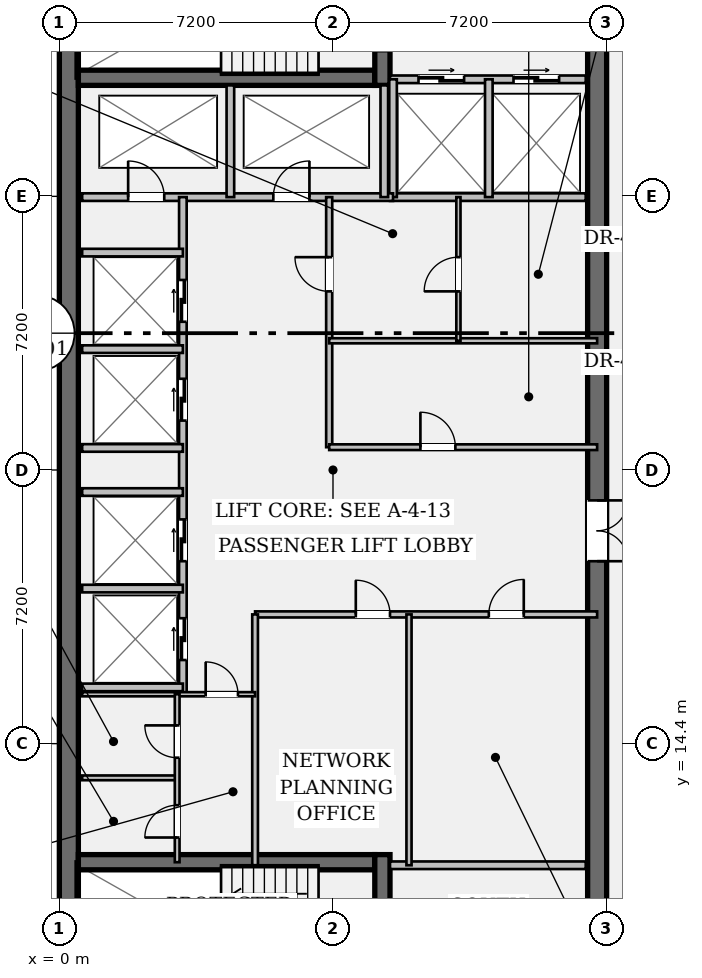
"""IFC4 building model, lengths in metres.
Left out: names, types, materials, properties, quantities, classifications, styles, units other than length and angle.
Written with IfcOpenShell. Run it as: python <this file> out.ifc"""

import sys

from ifc_helpers import new_model, si_unit, direction, frame, frame_2d, origin, place, context, subcontext, project, spatial, rectangle, extrude, element, fill, save


model = new_model("IFC4")
c1 = context("Model", 3, precision=1e-05, world=origin(), true_north=direction((0.0, 1.0)))
c2 = subcontext(c1, "Body", "Model", "MODEL_VIEW")
j1 = project(units=[si_unit("LENGTHUNIT", "METRE"), si_unit("PLANEANGLEUNIT", "RADIAN")], contexts=[c1])
p1 = place(None, origin())
s1 = spatial("IfcSite", under=j1, at=p1, CompositionType="ELEMENT")
p2 = place(p1, origin())
s2 = spatial("IfcBuilding", under=s1, at=p2, CompositionType="ELEMENT")
p3 = place(p2, frame((0.0, 0.0, 286.65)))
s3 = spatial("IfcBuildingStorey", under=s2, at=p3, CompositionType="ELEMENT", Elevation=286.65)
p4 = place(p3, frame((0.25, 7.2, 0.0), z_axis=(0.0, 0.0, 1.0), x_axis=(0.0, 1.0, 0.0)))
e1 = element("IfcWall", 1, at=p4, inside=s3, PredefinedType="SHEAR", context=c2, shape_type="SweptSolid", body=[
    extrude(rectangle(XDim=28.8, YDim=0.5, at=frame_2d((14.4, 0.0))), origin(), (0.0, 0.0, 1.0), 3.24),
])
p5 = place(p3, frame((14.15, 35.5, 0.0), z_axis=(0.0, 0.0, 1.0), x_axis=(0.0, -1.0, 0.0)))
e2 = element("IfcWall", 2, at=p5, inside=s3, PredefinedType="SHEAR", context=c2, shape_type="SweptSolid", body=[
    extrude(rectangle(XDim=27.8, YDim=0.5, at=frame_2d((13.9, 0.0))), origin(), (0.0, 0.0, 1.0), 3.24),
])
p6 = place(p5, frame((1.4, 0.0, 0.0)))
e3 = element("IfcOpeningElement", 3, at=p6, cuts=e2, PredefinedType="OPENING", context=c2, shape_type="SweptSolid", body=[
    extrude(rectangle(XDim=1.2, YDim=2.15, at=frame_2d((0.6, 1.075))), frame((0.0, 0.262, 0.0), z_axis=(0.0, -1.0, 0.0), x_axis=(1.0, 0.0, 0.0)), (0.0, 0.0, 1.0), 0.524),
])
p7 = place(p5, frame((25.35, 0.0, 0.0)))
e4 = element("IfcOpeningElement", 4, at=p7, cuts=e2, PredefinedType="OPENING", context=c2, shape_type="SweptSolid", body=[
    extrude(rectangle(XDim=1.2, YDim=2.15, at=frame_2d((0.6, 1.075))), frame((0.0, 0.262, 0.0), z_axis=(0.0, -1.0, 0.0), x_axis=(1.0, 0.0, 0.0)), (0.0, 0.0, 1.0), 0.524),
])
p8 = place(p5, frame((14.7, 0.0, 0.0)))
e5 = element("IfcOpeningElement", 5, at=p8, cuts=e2, PredefinedType="OPENING", context=c2, shape_type="SweptSolid", body=[
    extrude(rectangle(XDim=1.6, YDim=2.2, at=frame_2d((0.8, 1.1))), frame((0.0, 0.262, 0.0), z_axis=(0.0, -1.0, 0.0), x_axis=(1.0, 0.0, 0.0)), (0.0, 0.0, 1.0), 0.524),
])
for number, where, z_axis, x_axis in (
    (6, (0.5, 31.92, 0.0), (0.0, 0.0, 1.0), (1.0, 0.0, 0.0)),
    (7, (0.5, 11.28, 0.0), (0.0, 0.0, 1.0), (1.0, 0.0, 0.0)),
):
    element("IfcWall", number, at=place(p3, frame(where, z_axis=z_axis, x_axis=x_axis)), inside=s3, PredefinedType="SHEAR", context=c2, shape_type="SweptSolid", body=[
        extrude(rectangle(XDim=7.8, YDim=0.4, at=frame_2d((3.9, 0.0))), origin(), (0.0, 0.0, 1.0), 3.24),
    ])
p9 = place(p3, frame((8.5, 31.72, 0.0), z_axis=(0.0, 0.0, 1.0), x_axis=(0.0, 1.0, 0.0)))
e8 = element("IfcWall", 8, at=p9, inside=s3, PredefinedType="SHEAR", context=c2, shape_type="SweptSolid", body=[
    extrude(rectangle(XDim=3.78, YDim=0.4, at=frame_2d((1.89, 0.0))), origin(), (0.0, 0.0, 1.0), 3.24),
])
p10 = place(p9, frame((0.9, 0.0, 0.0)))
e9 = element("IfcOpeningElement", 9, at=p10, cuts=e8, PredefinedType="OPENING", context=c2, shape_type="SweptSolid", body=[
    extrude(rectangle(XDim=1.1, YDim=2.15, at=frame_2d((0.55, 1.075))), frame((0.0, 0.212, 0.0), z_axis=(0.0, -1.0, 0.0), x_axis=(1.0, 0.0, 0.0)), (0.0, 0.0, 1.0), 0.424),
])
p11 = place(p3, frame((8.5, 7.7, 0.0), z_axis=(0.0, 0.0, 1.0), x_axis=(0.0, 1.0, 0.0)))
e10 = element("IfcWall", 10, at=p11, inside=s3, PredefinedType="SHEAR", context=c2, shape_type="SweptSolid", body=[
    extrude(rectangle(XDim=3.78, YDim=0.4, at=frame_2d((1.89, 0.0))), origin(), (0.0, 0.0, 1.0), 3.24),
])
p12 = place(p11, frame((0.85, 0.0, 0.0)))
e11 = element("IfcOpeningElement", 11, at=p12, cuts=e10, PredefinedType="OPENING", context=c2, shape_type="SweptSolid", body=[
    extrude(rectangle(XDim=1.1, YDim=2.15, at=frame_2d((0.55, 1.075))), frame((0.0, 0.212, 0.0), z_axis=(0.0, -1.0, 0.0), x_axis=(1.0, 0.0, 0.0)), (0.0, 0.0, 1.0), 0.424),
])
p13 = place(p3, frame((8.7, 31.88, 0.0), z_axis=(0.0, 0.0, 1.0), x_axis=(1.0, 0.0, 0.0)))
e12 = element("IfcWall", 12, at=p13, inside=s3, PredefinedType="PARTITIONING", context=c2, shape_type="SweptSolid", body=[
    extrude(rectangle(XDim=5.15, YDim=0.2, at=frame_2d((2.575, 0.0))), origin(), (0.0, 0.0, 1.0), 3.24),
])
p14 = place(p13, frame((0.75, 0.0, 0.0)))
e13 = element("IfcOpeningElement", 13, at=p14, cuts=e12, PredefinedType="OPENING", context=c2, shape_type="SweptSolid", body=[
    extrude(rectangle(XDim=1.2, YDim=2.2, at=frame_2d((0.6, 1.1))), frame((0.0, 0.112, 0.0), z_axis=(0.0, -1.0, 0.0), x_axis=(1.0, 0.0, 0.0)), (0.0, 0.0, 1.0), 0.224),
])
p15 = place(p13, frame((3.25, 0.0, 0.0)))
e14 = element("IfcOpeningElement", 14, at=p15, cuts=e12, PredefinedType="OPENING", context=c2, shape_type="SweptSolid", body=[
    extrude(rectangle(XDim=1.2, YDim=2.2, at=frame_2d((0.6, 1.1))), frame((0.0, 0.112, 0.0), z_axis=(0.0, -1.0, 0.0), x_axis=(1.0, 0.0, 0.0)), (0.0, 0.0, 1.0), 0.224),
])
for number, where, z_axis, x_axis in (
    (15, (8.7, 11.2, 0.0), (0.0, 0.0, 1.0), (1.0, 0.0, 0.0)),
    (16, (8.7, 28.78, 0.0), (0.0, 0.0, 1.0), (1.0, 0.0, 0.0)),
):
    element("IfcWall", number, at=place(p3, frame(where, z_axis=z_axis, x_axis=x_axis)), inside=s3, PredefinedType="PARTITIONING", context=c2, shape_type="SweptSolid", body=[
        extrude(rectangle(XDim=5.15, YDim=0.2, at=frame_2d((2.575, 0.0))), origin(), (0.0, 0.0, 1.0), 3.24),
    ])
for number, where, z_axis, x_axis in (
    (17, (8.78, 28.78, 0.0), (0.0, 0.0, 1.0), (0.0, 1.0, 0.0)),
    (18, (11.3, 28.78, 0.0), (0.0, 0.0, 1.0), (0.0, 1.0, 0.0)),
):
    element("IfcWall", number, at=place(p3, frame(where, z_axis=z_axis, x_axis=x_axis)), inside=s3, PredefinedType="PARTITIONING", context=c2, shape_type="SweptSolid", body=[
        extrude(rectangle(XDim=3.1, YDim=0.2, at=frame_2d((1.55, 0.0))), origin(), (0.0, 0.0, 1.0), 3.24),
    ])
p16 = place(p3, frame((0.6, 28.78, 0.0), z_axis=(0.0, 0.0, 1.0), x_axis=(1.0, 0.0, 0.0)))
e19 = element("IfcWall", 19, at=p16, inside=s3, PredefinedType="PARTITIONING", context=c2, shape_type="SweptSolid", body=[
    extrude(rectangle(XDim=8.18, YDim=0.2, at=frame_2d((4.09, 0.0))), origin(), (0.0, 0.0, 1.0), 3.24),
])
p17 = place(p16, frame((1.21, 0.0, 0.0)))
e20 = element("IfcOpeningElement", 20, at=p17, cuts=e19, PredefinedType="OPENING", context=c2, shape_type="SweptSolid", body=[
    extrude(rectangle(XDim=0.95, YDim=2.15, at=frame_2d((0.475, 1.075))), frame((0.0, 0.112, 0.0), z_axis=(0.0, -1.0, 0.0), x_axis=(1.0, 0.0, 0.0)), (0.0, 0.0, 1.0), 0.224),
])
p18 = place(p16, frame((5.03, 0.0, 0.0)))
e21 = element("IfcOpeningElement", 21, at=p18, cuts=e19, PredefinedType="OPENING", context=c2, shape_type="SweptSolid", body=[
    extrude(rectangle(XDim=0.95, YDim=2.15, at=frame_2d((0.475, 1.075))), frame((0.0, 0.112, 0.0), z_axis=(0.0, -1.0, 0.0), x_axis=(1.0, 0.0, 0.0)), (0.0, 0.0, 1.0), 0.224),
])
for number, where, z_axis, x_axis in (
    (22, (4.5, 28.78, 0.0), (0.0, 0.0, 1.0), (0.0, 1.0, 0.0)),
    (23, (8.55, 28.78, 0.0), (0.0, 0.0, 1.0), (0.0, 1.0, 0.0)),
):
    element("IfcWall", number, at=place(p3, frame(where, z_axis=z_axis, x_axis=x_axis)), inside=s3, PredefinedType="PARTITIONING", context=c2, shape_type="SweptSolid", body=[
        extrude(rectangle(XDim=2.94, YDim=0.2, at=frame_2d((1.47, 0.0))), origin(), (0.0, 0.0, 1.0), 3.24),
    ])
p19 = place(p3, frame((3.25, 15.7, 0.0), z_axis=(0.0, 0.0, 1.0), x_axis=(0.0, 1.0, 0.0)))
e24 = element("IfcWall", 24, at=p19, inside=s3, PredefinedType="PARTITIONING", context=c2, shape_type="SweptSolid", body=[
    extrude(rectangle(XDim=13.08, YDim=0.2, at=frame_2d((6.54, 0.0))), origin(), (0.0, 0.0, 1.0), 3.24),
])
p20 = place(p19, frame((0.9, 0.0, 0.0)))
e25 = element("IfcOpeningElement", 25, at=p20, cuts=e24, PredefinedType="OPENING", context=c2, shape_type="SweptSolid", body=[
    extrude(rectangle(XDim=1.1, YDim=2.2, at=frame_2d((0.55, 1.1))), frame((0.0, 0.112, 0.0), z_axis=(0.0, -1.0, 0.0), x_axis=(1.0, 0.0, 0.0)), (0.0, 0.0, 1.0), 0.224),
])
p21 = place(p19, frame((3.5, 0.0, 0.0)))
e26 = element("IfcOpeningElement", 26, at=p21, cuts=e24, PredefinedType="OPENING", context=c2, shape_type="SweptSolid", body=[
    extrude(rectangle(XDim=1.1, YDim=2.2, at=frame_2d((0.55, 1.1))), frame((0.0, 0.112, 0.0), z_axis=(0.0, -1.0, 0.0), x_axis=(1.0, 0.0, 0.0)), (0.0, 0.0, 1.0), 0.224),
])
p22 = place(p19, frame((7.2, 0.0, 0.0)))
e27 = element("IfcOpeningElement", 27, at=p22, cuts=e24, PredefinedType="OPENING", context=c2, shape_type="SweptSolid", body=[
    extrude(rectangle(XDim=1.1, YDim=2.2, at=frame_2d((0.55, 1.1))), frame((0.0, 0.112, 0.0), z_axis=(0.0, -1.0, 0.0), x_axis=(1.0, 0.0, 0.0)), (0.0, 0.0, 1.0), 0.224),
])
p23 = place(p19, frame((9.8, 0.0, 0.0)))
e28 = element("IfcOpeningElement", 28, at=p23, cuts=e24, PredefinedType="OPENING", context=c2, shape_type="SweptSolid", body=[
    extrude(rectangle(XDim=1.1, YDim=2.2, at=frame_2d((0.55, 1.1))), frame((0.0, 0.112, 0.0), z_axis=(0.0, -1.0, 0.0), x_axis=(1.0, 0.0, 0.0)), (0.0, 0.0, 1.0), 0.224),
])
for number, where, z_axis, x_axis in (
    (29, (0.6, 15.88, 0.0), (0.0, 0.0, 1.0), (1.0, 0.0, 0.0)),
    (30, (0.6, 18.48, 0.0), (0.0, 0.0, 1.0), (1.0, 0.0, 0.0)),
    (31, (0.6, 22.18, 0.0), (0.0, 0.0, 1.0), (1.0, 0.0, 0.0)),
    (32, (0.6, 24.78, 0.0), (0.0, 0.0, 1.0), (1.0, 0.0, 0.0)),
    (33, (0.6, 21.02, 0.0), (0.0, 0.0, 1.0), (1.0, 0.0, 0.0)),
    (34, (0.6, 27.32, 0.0), (0.0, 0.0, 1.0), (1.0, 0.0, 0.0)),
):
    element("IfcWall", number, at=place(p3, frame(where, z_axis=z_axis, x_axis=x_axis)), inside=s3, PredefinedType="PARTITIONING", context=c2, shape_type="SweptSolid", body=[
        extrude(rectangle(XDim=2.65, YDim=0.2, at=frame_2d((1.325, 0.0))), origin(), (0.0, 0.0, 1.0), 3.24),
    ])
p24 = place(p3, frame((7.1, 22.2, 0.0), z_axis=(0.0, 0.0, 1.0), x_axis=(0.0, 1.0, 0.0)))
e35 = element("IfcWall", 35, at=p24, inside=s3, PredefinedType="PARTITIONING", context=c2, shape_type="SweptSolid", body=[
    extrude(rectangle(XDim=6.58, YDim=0.16, at=frame_2d((3.29, 0.0))), origin(), (0.0, 0.0, 1.0), 3.24),
])
p25 = place(p24, frame((4.1, 0.0, 0.0)))
e36 = element("IfcOpeningElement", 36, at=p25, cuts=e35, PredefinedType="OPENING", context=c2, shape_type="SweptSolid", body=[
    extrude(rectangle(XDim=0.9, YDim=2.15, at=frame_2d((0.45, 1.075))), frame((0.0, 0.092, 0.0), z_axis=(0.0, -1.0, 0.0), x_axis=(1.0, 0.0, 0.0)), (0.0, 0.0, 1.0), 0.184),
])
p26 = place(p3, frame((7.1, 22.2, 0.0), z_axis=(0.0, 0.0, 1.0), x_axis=(1.0, 0.0, 0.0)))
e37 = element("IfcWall", 37, at=p26, inside=s3, PredefinedType="PARTITIONING", context=c2, shape_type="SweptSolid", body=[
    extrude(rectangle(XDim=7.05, YDim=0.15, at=frame_2d((3.525, 0.0))), origin(), (0.0, 0.0, 1.0), 3.24),
])
p27 = place(p26, frame((2.4, 0.0, 0.0)))
e38 = element("IfcOpeningElement", 38, at=p27, cuts=e37, PredefinedType="OPENING", context=c2, shape_type="SweptSolid", body=[
    extrude(rectangle(XDim=0.92, YDim=2.15, at=frame_2d((0.46, 1.075))), frame((0.0, 0.087, 0.0), z_axis=(0.0, -1.0, 0.0), x_axis=(1.0, 0.0, 0.0)), (0.0, 0.0, 1.0), 0.174),
])
p28 = place(p3, frame((7.1, 25.0, 0.0), z_axis=(0.0, 0.0, 1.0), x_axis=(1.0, 0.0, 0.0)))
e39 = element("IfcWall", 39, at=p28, inside=s3, PredefinedType="PARTITIONING", context=c2, shape_type="SweptSolid", body=[
    extrude(rectangle(XDim=7.05, YDim=0.135, at=frame_2d((3.525, 0.0))), origin(), (0.0, 0.0, 1.0), 3.24),
])
p29 = place(p3, frame((10.5, 25.0, 0.0), z_axis=(0.0, 0.0, 1.0), x_axis=(0.0, 1.0, 0.0)))
e40 = element("IfcWall", 40, at=p29, inside=s3, PredefinedType="PARTITIONING", context=c2, shape_type="SweptSolid", body=[
    extrude(rectangle(XDim=3.78, YDim=0.11, at=frame_2d((1.89, 0.0))), origin(), (0.0, 0.0, 1.0), 3.24),
])
p30 = place(p29, frame((1.3, 0.0, 0.0)))
e41 = element("IfcOpeningElement", 41, at=p30, cuts=e40, PredefinedType="OPENING", context=c2, shape_type="SweptSolid", body=[
    extrude(rectangle(XDim=0.9, YDim=2.15, at=frame_2d((0.45, 1.075))), frame((0.0, 0.067, 0.0), z_axis=(0.0, -1.0, 0.0), x_axis=(1.0, 0.0, 0.0)), (0.0, 0.0, 1.0), 0.134),
])
p31 = place(p3, frame((5.15, 17.8, 0.0), z_axis=(0.0, 0.0, 1.0), x_axis=(1.0, 0.0, 0.0)))
e42 = element("IfcWall", 42, at=p31, inside=s3, PredefinedType="PARTITIONING", context=c2, shape_type="SweptSolid", body=[
    extrude(rectangle(XDim=9.0, YDim=0.16, at=frame_2d((4.5, 0.0))), origin(), (0.0, 0.0, 1.0), 3.24),
])
p32 = place(p31, frame((2.65, 0.0, 0.0)))
e43 = element("IfcOpeningElement", 43, at=p32, cuts=e42, PredefinedType="OPENING", context=c2, shape_type="SweptSolid", body=[
    extrude(rectangle(XDim=0.9, YDim=2.15, at=frame_2d((0.45, 1.075))), frame((0.0, 0.092, 0.0), z_axis=(0.0, -1.0, 0.0), x_axis=(1.0, 0.0, 0.0)), (0.0, 0.0, 1.0), 0.184),
])
p33 = place(p31, frame((6.15, 0.0, 0.0)))
e44 = element("IfcOpeningElement", 44, at=p33, cuts=e42, PredefinedType="OPENING", context=c2, shape_type="SweptSolid", body=[
    extrude(rectangle(XDim=0.92, YDim=2.15, at=frame_2d((0.46, 1.075))), frame((0.0, 0.092, 0.0), z_axis=(0.0, -1.0, 0.0), x_axis=(1.0, 0.0, 0.0)), (0.0, 0.0, 1.0), 0.184),
])
p34 = place(p3, frame((5.15, 11.2, 0.0), z_axis=(0.0, 0.0, 1.0), x_axis=(0.0, 1.0, 0.0)))
e45 = element("IfcWall", 45, at=p34, inside=s3, PredefinedType="PARTITIONING", context=c2, shape_type="SweptSolid", body=[
    extrude(rectangle(XDim=6.6, YDim=0.15, at=frame_2d((3.3, 0.0))), origin(), (0.0, 0.0, 1.0), 3.24),
])
p35 = place(p3, frame((9.2, 11.2, 0.0), z_axis=(0.0, 0.0, 1.0), x_axis=(0.0, 1.0, 0.0)))
e46 = element("IfcWall", 46, at=p35, inside=s3, PredefinedType="PARTITIONING", context=c2, shape_type="SweptSolid", body=[
    extrude(rectangle(XDim=6.6, YDim=0.135, at=frame_2d((3.3, 0.0))), origin(), (0.0, 0.0, 1.0), 3.24),
])
p36 = place(p3, frame((0.6, 15.7, 0.0), z_axis=(0.0, 0.0, 1.0), x_axis=(1.0, 0.0, 0.0)))
e47 = element("IfcWall", 47, at=p36, inside=s3, PredefinedType="PARTITIONING", context=c2, shape_type="SweptSolid", body=[
    extrude(rectangle(XDim=4.55, YDim=0.11, at=frame_2d((2.275, 0.0))), origin(), (0.0, 0.0, 1.0), 3.24),
])
p37 = place(p36, frame((3.25, 0.0, 0.0)))
e48 = element("IfcOpeningElement", 48, at=p37, cuts=e47, PredefinedType="OPENING", context=c2, shape_type="SweptSolid", body=[
    extrude(rectangle(XDim=0.85, YDim=2.15, at=frame_2d((0.425, 1.075))), frame((0.0, 0.067, 0.0), z_axis=(0.0, -1.0, 0.0), x_axis=(1.0, 0.0, 0.0)), (0.0, 0.0, 1.0), 0.134),
])
p38 = place(p3, frame((0.6, 13.5, 0.0), z_axis=(0.0, 0.0, 1.0), x_axis=(1.0, 0.0, 0.0)))
e49 = element("IfcWall", 49, at=p38, inside=s3, PredefinedType="PARTITIONING", context=c2, shape_type="SweptSolid", body=[
    extrude(rectangle(XDim=2.5, YDim=0.125, at=frame_2d((1.25, 0.0))), origin(), (0.0, 0.0, 1.0), 3.24),
])
p39 = place(p3, frame((3.1, 11.28, 0.0), z_axis=(0.0, 0.0, 1.0), x_axis=(0.0, 1.0, 0.0)))
e50 = element("IfcWall", 50, at=p39, inside=s3, PredefinedType="PARTITIONING", context=c2, shape_type="SweptSolid", body=[
    extrude(rectangle(XDim=4.42, YDim=0.125, at=frame_2d((2.21, 0.0))), origin(), (0.0, 0.0, 1.0), 3.24),
])
p40 = place(p39, frame((0.65, 0.0, 0.0)))
e51 = element("IfcOpeningElement", 51, at=p40, cuts=e50, PredefinedType="OPENING", context=c2, shape_type="SweptSolid", body=[
    extrude(rectangle(XDim=0.85, YDim=2.15, at=frame_2d((0.425, 1.075))), frame((0.0, 0.074, 0.0), z_axis=(0.0, -1.0, 0.0), x_axis=(1.0, 0.0, 0.0)), (0.0, 0.0, 1.0), 0.149),
])
p41 = place(p39, frame((2.75, 0.0, 0.0)))
e52 = element("IfcOpeningElement", 52, at=p41, cuts=e50, PredefinedType="OPENING", context=c2, shape_type="SweptSolid", body=[
    extrude(rectangle(XDim=0.85, YDim=2.15, at=frame_2d((0.425, 1.075))), frame((0.0, 0.074, 0.0), z_axis=(0.0, -1.0, 0.0), x_axis=(1.0, 0.0, 0.0)), (0.0, 0.0, 1.0), 0.149),
])
p42 = place(p14, origin())
e53 = element("IfcDoor", 53, at=p42, inside=s3, OperationType="DOUBLE_DOOR_SLIDING", PredefinedType="DOOR", context=c2, shape_type="SweptSolid", body=[
    extrude(rectangle(XDim=1.2, YDim=2.2, at=frame_2d((0.6, 1.1))), frame((0.0, 0.025, 0.0), z_axis=(0.0, -1.0, 0.0), x_axis=(1.0, 0.0, 0.0)), (0.0, 0.0, 1.0), 0.05),
])
fill(e13, e53)
p43 = place(p15, origin())
e54 = element("IfcDoor", 54, at=p43, inside=s3, OperationType="DOUBLE_DOOR_SLIDING", PredefinedType="DOOR", context=c2, shape_type="SweptSolid", body=[
    extrude(rectangle(XDim=1.2, YDim=2.2, at=frame_2d((0.6, 1.1))), frame((0.0, 0.025, 0.0), z_axis=(0.0, -1.0, 0.0), x_axis=(1.0, 0.0, 0.0)), (0.0, 0.0, 1.0), 0.05),
])
fill(e14, e54)
p44 = place(p17, origin())
e55 = element("IfcDoor", 55, at=p44, inside=s3, OperationType="SINGLE_SWING_LEFT", PredefinedType="DOOR", context=c2, shape_type="SweptSolid", body=[
    extrude(rectangle(XDim=0.95, YDim=2.15, at=frame_2d((0.475, 1.075))), frame((0.0, 0.025, 0.0), z_axis=(0.0, -1.0, 0.0), x_axis=(1.0, 0.0, 0.0)), (0.0, 0.0, 1.0), 0.05),
])
fill(e20, e55)
p45 = place(p18, origin())
e56 = element("IfcDoor", 56, at=p45, inside=s3, OperationType="SINGLE_SWING_RIGHT", PredefinedType="DOOR", context=c2, shape_type="SweptSolid", body=[
    extrude(rectangle(XDim=0.95, YDim=2.15, at=frame_2d((0.475, 1.075))), frame((0.0, 0.025, 0.0), z_axis=(0.0, -1.0, 0.0), x_axis=(1.0, 0.0, 0.0)), (0.0, 0.0, 1.0), 0.05),
])
fill(e21, e56)
p46 = place(p8, origin())
e57 = element("IfcDoor", 57, at=p46, inside=s3, OperationType="DOUBLE_DOOR_SINGLE_SWING", PredefinedType="DOOR", context=c2, shape_type="SweptSolid", body=[
    extrude(rectangle(XDim=1.6, YDim=2.2, at=frame_2d((0.8, 1.1))), frame((0.0, 0.025, 0.0), z_axis=(0.0, -1.0, 0.0), x_axis=(1.0, 0.0, 0.0)), (0.0, 0.0, 1.0), 0.05),
])
fill(e5, e57)
p47 = place(p20, origin())
e58 = element("IfcDoor", 58, at=p47, inside=s3, OperationType="DOUBLE_DOOR_SLIDING", PredefinedType="DOOR", context=c2, shape_type="SweptSolid", body=[
    extrude(rectangle(XDim=1.1, YDim=2.2, at=frame_2d((0.55, 1.1))), frame((0.0, 0.025, 0.0), z_axis=(0.0, -1.0, 0.0), x_axis=(1.0, 0.0, 0.0)), (0.0, 0.0, 1.0), 0.05),
])
fill(e25, e58)
p48 = place(p21, origin())
e59 = element("IfcDoor", 59, at=p48, inside=s3, OperationType="DOUBLE_DOOR_SLIDING", PredefinedType="DOOR", context=c2, shape_type="SweptSolid", body=[
    extrude(rectangle(XDim=1.1, YDim=2.2, at=frame_2d((0.55, 1.1))), frame((0.0, 0.025, 0.0), z_axis=(0.0, -1.0, 0.0), x_axis=(1.0, 0.0, 0.0)), (0.0, 0.0, 1.0), 0.05),
])
fill(e26, e59)
p49 = place(p22, origin())
e60 = element("IfcDoor", 60, at=p49, inside=s3, OperationType="DOUBLE_DOOR_SLIDING", PredefinedType="DOOR", context=c2, shape_type="SweptSolid", body=[
    extrude(rectangle(XDim=1.1, YDim=2.2, at=frame_2d((0.55, 1.1))), frame((0.0, 0.025, 0.0), z_axis=(0.0, -1.0, 0.0), x_axis=(1.0, 0.0, 0.0)), (0.0, 0.0, 1.0), 0.05),
])
fill(e27, e60)
p50 = place(p23, origin())
e61 = element("IfcDoor", 61, at=p50, inside=s3, OperationType="DOUBLE_DOOR_SLIDING", PredefinedType="DOOR", context=c2, shape_type="SweptSolid", body=[
    extrude(rectangle(XDim=1.1, YDim=2.2, at=frame_2d((0.55, 1.1))), frame((0.0, 0.025, 0.0), z_axis=(0.0, -1.0, 0.0), x_axis=(1.0, 0.0, 0.0)), (0.0, 0.0, 1.0), 0.05),
])
fill(e28, e61)
p51 = place(p27, origin())
e62 = element("IfcDoor", 62, at=p51, inside=s3, OperationType="SINGLE_SWING_LEFT", PredefinedType="DOOR", context=c2, shape_type="SweptSolid", body=[
    extrude(rectangle(XDim=0.92, YDim=2.15, at=frame_2d((0.46, 1.075))), frame((0.0, 0.025, 0.0), z_axis=(0.0, -1.0, 0.0), x_axis=(1.0, 0.0, 0.0)), (0.0, 0.0, 1.0), 0.05),
])
fill(e38, e62)
p52 = place(p25, origin())
e63 = element("IfcDoor", 63, at=p52, inside=s3, OperationType="SINGLE_SWING_RIGHT", PredefinedType="DOOR", context=c2, shape_type="SweptSolid", body=[
    extrude(rectangle(XDim=0.9, YDim=2.15, at=frame_2d((0.45, 1.075))), frame((0.0, 0.025, 0.0), z_axis=(0.0, -1.0, 0.0), x_axis=(1.0, 0.0, 0.0)), (0.0, 0.0, 1.0), 0.05),
])
fill(e36, e63)
p53 = place(p30, origin())
e64 = element("IfcDoor", 64, at=p53, inside=s3, OperationType="SINGLE_SWING_LEFT", PredefinedType="DOOR", context=c2, shape_type="SweptSolid", body=[
    extrude(rectangle(XDim=0.9, YDim=2.15, at=frame_2d((0.45, 1.075))), frame((0.0, 0.025, 0.0), z_axis=(0.0, -1.0, 0.0), x_axis=(1.0, 0.0, 0.0)), (0.0, 0.0, 1.0), 0.05),
])
fill(e41, e64)
p54 = place(p32, origin())
e65 = element("IfcDoor", 65, at=p54, inside=s3, OperationType="SINGLE_SWING_LEFT", PredefinedType="DOOR", context=c2, shape_type="SweptSolid", body=[
    extrude(rectangle(XDim=0.9, YDim=2.15, at=frame_2d((0.45, 1.075))), frame((0.0, 0.025, 0.0), z_axis=(0.0, -1.0, 0.0), x_axis=(1.0, 0.0, 0.0)), (0.0, 0.0, 1.0), 0.05),
])
fill(e43, e65)
p55 = place(p33, origin())
e66 = element("IfcDoor", 66, at=p55, inside=s3, OperationType="SINGLE_SWING_RIGHT", PredefinedType="DOOR", context=c2, shape_type="SweptSolid", body=[
    extrude(rectangle(XDim=0.92, YDim=2.15, at=frame_2d((0.46, 1.075))), frame((0.0, 0.025, 0.0), z_axis=(0.0, -1.0, 0.0), x_axis=(1.0, 0.0, 0.0)), (0.0, 0.0, 1.0), 0.05),
])
fill(e44, e66)
p56 = place(p37, origin())
e67 = element("IfcDoor", 67, at=p56, inside=s3, OperationType="SINGLE_SWING_LEFT", PredefinedType="DOOR", context=c2, shape_type="SweptSolid", body=[
    extrude(rectangle(XDim=0.85, YDim=2.15, at=frame_2d((0.425, 1.075))), frame((0.0, 0.025, 0.0), z_axis=(0.0, -1.0, 0.0), x_axis=(1.0, 0.0, 0.0)), (0.0, 0.0, 1.0), 0.05),
])
fill(e48, e67)
p57 = place(p40, origin())
e68 = element("IfcDoor", 68, at=p57, inside=s3, OperationType="SINGLE_SWING_LEFT", PredefinedType="DOOR", context=c2, shape_type="SweptSolid", body=[
    extrude(rectangle(XDim=0.85, YDim=2.15, at=frame_2d((0.425, 1.075))), frame((0.0, 0.025, 0.0), z_axis=(0.0, -1.0, 0.0), x_axis=(1.0, 0.0, 0.0)), (0.0, 0.0, 1.0), 0.05),
])
fill(e51, e68)
p58 = place(p41, origin())
e69 = element("IfcDoor", 69, at=p58, inside=s3, OperationType="SINGLE_SWING_RIGHT", PredefinedType="DOOR", context=c2, shape_type="SweptSolid", body=[
    extrude(rectangle(XDim=0.85, YDim=2.15, at=frame_2d((0.425, 1.075))), frame((0.0, 0.025, 0.0), z_axis=(0.0, -1.0, 0.0), x_axis=(1.0, 0.0, 0.0)), (0.0, 0.0, 1.0), 0.05),
])
fill(e52, e69)
save(model, sys.argv[1])
